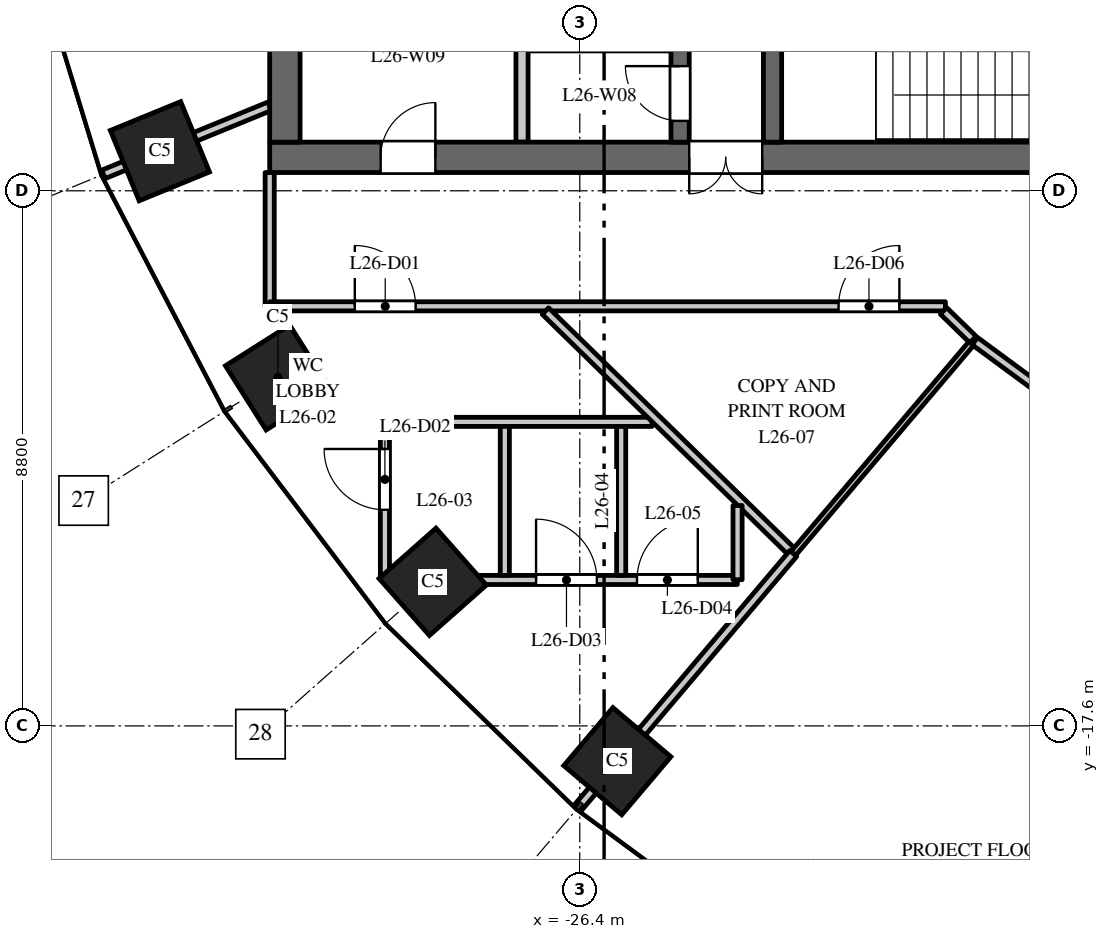
"""IFC4 building model, lengths in metres.
Left out: names, types, materials, properties, quantities, classifications, styles, units other than length and angle.
Written with IfcOpenShell. Run it as: python <this file> out.ifc"""

import sys

from ifc_helpers import new_model, si_unit, direction, frame, frame_2d, origin, origin_2d, place, context, subcontext, project, spatial, rectangle, extrude, element, fill, save


model = new_model("IFC4")
c1 = context("Model", 3, precision=1e-05, world=origin(), true_north=direction((0.0, 1.0)))
c2 = subcontext(c1, "Body", "Model", "MODEL_VIEW")
j1 = project(units=[si_unit("LENGTHUNIT", "METRE"), si_unit("PLANEANGLEUNIT", "RADIAN")], contexts=[c1])
p1 = place(None, origin())
s1 = spatial("IfcSite", under=j1, at=p1, CompositionType="ELEMENT")
p2 = place(p1, origin())
s2 = spatial("IfcBuilding", under=s1, at=p2, CompositionType="ELEMENT")
p3 = place(p2, frame((0.0, 0.0, 116.0)))
s3 = spatial("IfcBuildingStorey", under=s2, at=p3, CompositionType="ELEMENT", Elevation=116.0)
for number, where, z_axis, x_axis in (
    (1, (-33.305, -8.149, 0.0), (0.0, 0.0, 1.0), (0.379, -0.925, 0.0)),
    (2, (-31.365, -11.871, 0.0), (0.0, 0.0, 1.0), (0.535, -0.845, 0.0)),
    (3, (-28.819, -15.23, 0.0), (0.0, 0.0, 1.0), (0.663, -0.749, 0.0)),
    (4, (-25.783, -18.18, 0.0), (0.0, 0.0, 1.0), (0.763, -0.646, 0.0)),
):
    element("IfcColumn", number, at=place(p3, frame(where, z_axis=z_axis, x_axis=x_axis)), inside=s3, PredefinedType="COLUMN", context=c2, shape_type="SweptSolid", body=[
        extrude(rectangle(XDim=1.25, YDim=1.25, at=origin_2d()), origin(), (0.0, 0.0, 1.0), 4.0),
    ])
p4 = place(p3, frame((-16.5, -8.25, 0.0), z_axis=(0.0, 0.0, 1.0), x_axis=(-1.0, 0.0, 0.0)))
e5 = element("IfcWall", 5, at=p4, inside=s3, PredefinedType="SHEAR", context=c2, shape_type="SweptSolid", body=[
    extrude(rectangle(XDim=15.0, YDim=0.5, at=frame_2d((7.5, 0.0))), origin(), (0.0, 0.0, 1.0), 3.7),
])
p5 = place(p4, frame((6.9, 0.0, 0.0)))
e6 = element("IfcOpeningElement", 6, at=p5, cuts=e5, PredefinedType="OPENING", context=c2, shape_type="SweptSolid", body=[
    extrude(rectangle(XDim=1.2, YDim=2.1, at=frame_2d((0.6, 1.05))), frame((0.0, 0.26, 0.0), z_axis=(0.0, -1.0, 0.0), x_axis=(1.0, 0.0, 0.0)), (0.0, 0.0, 1.0), 0.52),
])
p6 = place(p4, frame((12.275, 0.0, 0.0)))
e7 = element("IfcOpeningElement", 7, at=p6, cuts=e5, PredefinedType="OPENING", context=c2, shape_type="SweptSolid", body=[
    extrude(rectangle(XDim=0.9, YDim=2.1, at=frame_2d((0.45, 1.05))), frame((0.0, 0.26, 0.0), z_axis=(0.0, -1.0, 0.0), x_axis=(1.0, 0.0, 0.0)), (0.0, 0.0, 1.0), 0.52),
])
p7 = place(p3, frame((-24.75, -8.0, 0.0), z_axis=(0.0, 0.0, 1.0), x_axis=(0.0, 1.0, 0.0)))
e8 = element("IfcWall", 8, at=p7, inside=s3, PredefinedType="SHEAR", context=c2, shape_type="SweptSolid", body=[
    extrude(rectangle(XDim=16.0, YDim=0.3, at=frame_2d((8.0, 0.0))), origin(), (0.0, 0.0, 1.0), 3.7),
])
p8 = place(p7, frame((4.425, 0.0, 0.0)))
e9 = element("IfcOpeningElement", 9, at=p8, cuts=e8, PredefinedType="OPENING", context=c2, shape_type="SweptSolid", body=[
    extrude(rectangle(XDim=1.1, YDim=2.1, at=frame_2d((0.55, 1.05))), frame((0.0, 0.16, 0.0), z_axis=(0.0, -1.0, 0.0), x_axis=(1.0, 0.0, 0.0)), (0.0, 0.0, 1.0), 0.32),
])
p9 = place(p7, frame((7.45, 0.0, 0.0)))
e10 = element("IfcOpeningElement", 10, at=p9, cuts=e8, PredefinedType="OPENING", context=c2, shape_type="SweptSolid", body=[
    extrude(rectangle(XDim=1.1, YDim=2.1, at=frame_2d((0.55, 1.05))), frame((0.0, 0.16, 0.0), z_axis=(0.0, -1.0, 0.0), x_axis=(1.0, 0.0, 0.0)), (0.0, 0.0, 1.0), 0.32),
])
p10 = place(p7, frame((10.425, 0.0, 0.0)))
e11 = element("IfcOpeningElement", 11, at=p10, cuts=e8, PredefinedType="OPENING", context=c2, shape_type="SweptSolid", body=[
    extrude(rectangle(XDim=1.2, YDim=2.1, at=frame_2d((0.6, 1.05))), frame((0.0, 0.16, 0.0), z_axis=(0.0, -1.0, 0.0), x_axis=(1.0, 0.0, 0.0)), (0.0, 0.0, 1.0), 0.32),
])
p11 = place(p7, frame((13.75, 0.0, 0.0)))
e12 = element("IfcOpeningElement", 12, at=p11, cuts=e8, PredefinedType="OPENING", context=c2, shape_type="SweptSolid", body=[
    extrude(rectangle(XDim=0.9, YDim=2.1, at=frame_2d((0.45, 1.05))), frame((0.0, 0.16, 0.0), z_axis=(0.0, -1.0, 0.0), x_axis=(1.0, 0.0, 0.0)), (0.0, 0.0, 1.0), 0.32),
])
p12 = place(p7, frame((1.975, 0.0, 0.0)))
e13 = element("IfcOpeningElement", 13, at=p12, cuts=e8, PredefinedType="OPENING", context=c2, shape_type="SweptSolid", body=[
    extrude(rectangle(XDim=0.9, YDim=2.1, at=frame_2d((0.45, 1.05))), frame((0.0, 0.16, 0.0), z_axis=(0.0, -1.0, 0.0), x_axis=(1.0, 0.0, 0.0)), (0.0, 0.0, 1.0), 0.32),
])
p13 = place(p7, frame((0.35, 0.0, 0.0)))
e14 = element("IfcOpeningElement", 14, at=p13, cuts=e8, PredefinedType="OPENING", context=c2, shape_type="SweptSolid", body=[
    extrude(rectangle(XDim=0.9, YDim=2.1, at=frame_2d((0.45, 1.05))), frame((0.0, 0.16, 0.0), z_axis=(0.0, -1.0, 0.0), x_axis=(1.0, 0.0, 0.0)), (0.0, 0.0, 1.0), 0.32),
])
p14 = place(p3, frame((-31.25, -8.0, 0.0), z_axis=(0.0, 0.0, 1.0), x_axis=(0.0, 1.0, 0.0)))
e15 = element("IfcWall", 15, at=p14, inside=s3, PredefinedType="SHEAR", context=c2, shape_type="SweptSolid", body=[
    extrude(rectangle(XDim=16.0, YDim=0.5, at=frame_2d((8.0, 0.0))), origin(), (0.0, 0.0, 1.0), 3.7),
])
p15 = place(p3, frame((-27.35, -8.0, 0.0), z_axis=(0.0, 0.0, 1.0), x_axis=(0.0, 1.0, 0.0)))
e16 = element("IfcWall", 16, at=p15, inside=s3, PredefinedType="PARTITIONING", context=c2, shape_type="SweptSolid", body=[
    extrude(rectangle(XDim=3.25, YDim=0.2, at=frame_2d((1.625, 0.0))), origin(), (0.0, 0.0, 1.0), 3.7),
])
p16 = place(p3, frame((-23.23, -8.0, 0.0), z_axis=(0.0, 0.0, 1.0), x_axis=(0.0, 1.0, 0.0)))
e17 = element("IfcWall", 17, at=p16, inside=s3, PredefinedType="SHEAR", context=c2, shape_type="SweptSolid", body=[
    extrude(rectangle(XDim=7.875, YDim=0.3, at=frame_2d((3.938, 0.0))), origin(), (0.0, 0.0, 1.0), 3.7),
])
p17 = place(p16, frame((5.15, 0.0, 0.0)))
e18 = element("IfcOpeningElement", 18, at=p17, cuts=e17, PredefinedType="OPENING", context=c2, shape_type="SweptSolid", body=[
    extrude(rectangle(XDim=1.1, YDim=2.1, at=frame_2d((0.55, 1.05))), frame((0.0, 0.16, 0.0), z_axis=(0.0, -1.0, 0.0), x_axis=(1.0, 0.0, 0.0)), (0.0, 0.0, 1.0), 0.32),
])
p18 = place(p3, frame((-34.234, -8.53, 0.0), z_axis=(0.0, 0.0, 1.0), x_axis=(0.925344112436, 0.379128307542, 0.0)))
e19 = element("IfcWall", 19, at=p18, inside=s3, PredefinedType="PARTITIONING", context=c2, shape_type="SweptSolid", body=[
    extrude(rectangle(XDim=2.954, YDim=0.15, at=frame_2d((1.477, 0.0))), origin(), (0.0, 0.0, 1.0), 2.9),
])
p19 = place(p3, frame((-31.5, -10.7, 0.0), z_axis=(0.0, 0.0, 1.0), x_axis=(0.0, 1.0, 0.0)))
e20 = element("IfcWall", 20, at=p19, inside=s3, PredefinedType="PARTITIONING", context=c2, shape_type="SweptSolid", body=[
    extrude(rectangle(XDim=2.2, YDim=0.15, at=frame_2d((1.1, 0.0))), origin(), (0.0, 0.0, 1.0), 3.7),
])
p20 = place(p3, frame((-31.5, -10.7, 0.0), z_axis=(0.0, 0.0, 1.0), x_axis=(1.0, 0.0, 0.0)))
e21 = element("IfcWall", 21, at=p20, inside=s3, PredefinedType="PARTITIONING", context=c2, shape_type="SweptSolid", body=[
    extrude(rectangle(XDim=11.113, YDim=0.15, at=frame_2d((5.557, 0.0))), origin(), (0.0, 0.0, 1.0), 3.1),
])
p21 = place(p20, frame((1.4, 0.0, 0.0)))
e22 = element("IfcOpeningElement", 22, at=p21, cuts=e21, PredefinedType="OPENING", context=c2, shape_type="SweptSolid", body=[
    extrude(rectangle(XDim=1.0, YDim=2.1, at=frame_2d((0.5, 1.05))), frame((0.0, 0.085, 0.0), z_axis=(0.0, -1.0, 0.0), x_axis=(1.0, 0.0, 0.0)), (0.0, 0.0, 1.0), 0.17),
])
p22 = place(p20, frame((9.356, 0.0, 0.0)))
e23 = element("IfcOpeningElement", 23, at=p22, cuts=e21, PredefinedType="OPENING", context=c2, shape_type="SweptSolid", body=[
    extrude(rectangle(XDim=1.0, YDim=2.1, at=frame_2d((0.5, 1.05))), frame((0.0, 0.085, 0.0), z_axis=(0.0, -1.0, 0.0), x_axis=(1.0, 0.0, 0.0)), (0.0, 0.0, 1.0), 0.17),
])
p23 = place(p3, frame((-29.605, -15.196, 0.0), z_axis=(0.0, 0.0, 1.0), x_axis=(0.0, 1.0, 0.0)))
e24 = element("IfcWall", 24, at=p23, inside=s3, PredefinedType="PARTITIONING", context=c2, shape_type="SweptSolid", body=[
    extrude(rectangle(XDim=2.596, YDim=0.15, at=frame_2d((1.298, 0.0))), origin(), (0.0, 0.0, 1.0), 2.9),
])
p24 = place(p23, frame((1.15, 0.0, 0.0)))
e25 = element("IfcOpeningElement", 25, at=p24, cuts=e24, PredefinedType="OPENING", context=c2, shape_type="SweptSolid", body=[
    extrude(rectangle(XDim=1.0, YDim=2.1, at=frame_2d((0.5, 1.05))), frame((0.0, 0.085, 0.0), z_axis=(0.0, -1.0, 0.0), x_axis=(1.0, 0.0, 0.0)), (0.0, 0.0, 1.0), 0.17),
])
p25 = place(p3, frame((-29.605, -12.6, 0.0), z_axis=(0.0, 0.0, 1.0), x_axis=(1.0, 0.0, 0.0)))
e26 = element("IfcWall", 26, at=p25, inside=s3, PredefinedType="PARTITIONING", context=c2, shape_type="SweptSolid", body=[
    extrude(rectangle(XDim=4.393, YDim=0.15, at=frame_2d((2.197, 0.0))), origin(), (0.0, 0.0, 1.0), 3.7),
])
p26 = place(p3, frame((-29.601, -15.2, 0.0), z_axis=(0.0, 0.0, 1.0), x_axis=(1.0, 0.0, 0.0)))
e27 = element("IfcWall", 27, at=p26, inside=s3, PredefinedType="PARTITIONING", context=c2, shape_type="SweptSolid", body=[
    extrude(rectangle(XDim=5.792, YDim=0.15, at=frame_2d((2.896, 0.0))), origin(), (0.0, 0.0, 1.0), 2.9),
])
p27 = place(p26, frame((2.482, 0.0, 0.0)))
e28 = element("IfcOpeningElement", 28, at=p27, cuts=e27, PredefinedType="OPENING", context=c2, shape_type="SweptSolid", body=[
    extrude(rectangle(XDim=1.0, YDim=2.1, at=frame_2d((0.5, 1.05))), frame((0.0, 0.085, 0.0), z_axis=(0.0, -1.0, 0.0), x_axis=(1.0, 0.0, 0.0)), (0.0, 0.0, 1.0), 0.17),
])
p28 = place(p26, frame((4.142, 0.0, 0.0)))
e29 = element("IfcOpeningElement", 29, at=p28, cuts=e27, PredefinedType="OPENING", context=c2, shape_type="SweptSolid", body=[
    extrude(rectangle(XDim=1.0, YDim=2.1, at=frame_2d((0.5, 1.05))), frame((0.0, 0.085, 0.0), z_axis=(0.0, -1.0, 0.0), x_axis=(1.0, 0.0, 0.0)), (0.0, 0.0, 1.0), 0.17),
])
p29 = place(p3, frame((-27.633, -15.125, 0.0), z_axis=(0.0, 0.0, 1.0), x_axis=(0.0, 1.0, 0.0)))
e30 = element("IfcWall", 30, at=p29, inside=s3, PredefinedType="PARTITIONING", context=c2, shape_type="SweptSolid", body=[
    extrude(rectangle(XDim=2.45, YDim=0.15, at=frame_2d((1.225, 0.0))), origin(), (0.0, 0.0, 1.0), 3.7),
])
p30 = place(p3, frame((-26.965, -10.778, 0.0), z_axis=(0.0, 0.0, 1.0), x_axis=(0.715154119379, -0.698966798593, 0.0)))
e31 = element("IfcWall", 31, at=p30, inside=s3, PredefinedType="PARTITIONING", context=c2, shape_type="SweptSolid", body=[
    extrude(rectangle(XDim=5.701, YDim=0.15, at=frame_2d((2.851, 0.0))), origin(), (0.0, 0.0, 1.0), 3.7),
])
p31 = place(p3, frame((-26.43, -18.945, 0.0), z_axis=(0.0, 0.0, 1.0), x_axis=(0.646289642104, 0.763092195288, 0.0)))
e32 = element("IfcWall", 32, at=p31, inside=s3, PredefinedType="PARTITIONING", context=c2, shape_type="SweptSolid", body=[
    extrude(rectangle(XDim=5.48, YDim=0.15, at=frame_2d((2.74, 0.0))), origin(), (0.0, 0.0, 1.0), 2.75),
])
p32 = place(p3, frame((-25.719, -15.125, 0.0), z_axis=(0.0, 0.0, 1.0), x_axis=(0.0, 1.0, 0.0)))
e33 = element("IfcWall", 33, at=p32, inside=s3, PredefinedType="PARTITIONING", context=c2, shape_type="SweptSolid", body=[
    extrude(rectangle(XDim=2.45, YDim=0.15, at=frame_2d((1.225, 0.0))), origin(), (0.0, 0.0, 1.0), 3.7),
])
p33 = place(p3, frame((-23.805, -15.196, 0.0), z_axis=(0.0, 0.0, 1.0), x_axis=(0.0, 1.0, 0.0)))
e34 = element("IfcWall", 34, at=p33, inside=s3, PredefinedType="PARTITIONING", context=c2, shape_type="SweptSolid", body=[
    extrude(rectangle(XDim=1.22, YDim=0.15, at=frame_2d((0.61, 0.0))), origin(), (0.0, 0.0, 1.0), 3.7),
])
p34 = place(p3, frame((-22.888, -14.763, 0.0), z_axis=(0.0, 0.0, 1.0), x_axis=(0.646640834677, 0.7627946191, 0.0)))
e35 = element("IfcWall", 35, at=p34, inside=s3, PredefinedType="PARTITIONING", context=c2, shape_type="SweptSolid", body=[
    extrude(rectangle(XDim=4.588, YDim=0.1, at=frame_2d((2.294, 0.0))), origin(), (0.0, 0.0, 1.0), 3.7),
])
p35 = place(p3, frame((-20.418, -10.775, 0.0), z_axis=(0.0, 0.0, 1.0), x_axis=(0.717145300924, -0.69692368116, 0.0)))
e36 = element("IfcWall", 36, at=p35, inside=s3, PredefinedType="PARTITIONING", context=c2, shape_type="SweptSolid", body=[
    extrude(rectangle(XDim=0.676, YDim=0.15, at=frame_2d((0.338, 0.0))), origin(), (0.0, 0.0, 1.0), 3.7),
])
p36 = place(p3, frame((-19.903, -11.272, 0.0), z_axis=(0.0, 0.0, 1.0), x_axis=(0.805228684186, -0.592964388613, 0.0)))
e37 = element("IfcWall", 37, at=p36, inside=s3, PredefinedType="PARTITIONING", context=c2, shape_type="SweptSolid", body=[
    extrude(rectangle(XDim=3.052, YDim=0.15, at=frame_2d((1.526, 0.0))), origin(), (0.0, 0.0, 1.0), 2.75),
])
p37 = place(p5, origin())
e38 = element("IfcDoor", 38, at=p37, inside=s3, OperationType="DOUBLE_DOOR_DOUBLE_SWING", PredefinedType="DOOR", context=c2, shape_type="SweptSolid", body=[
    extrude(rectangle(XDim=1.2, YDim=2.1, at=frame_2d((0.6, 1.05))), frame((0.0, 0.025, 0.0), z_axis=(0.0, -1.0, 0.0), x_axis=(1.0, 0.0, 0.0)), (0.0, 0.0, 1.0), 0.05),
])
fill(e6, e38)
p38 = place(p13, origin())
e39 = element("IfcDoor", 39, at=p38, inside=s3, OperationType="SINGLE_SWING_LEFT", PredefinedType="DOOR", context=c2, shape_type="SweptSolid", body=[
    extrude(rectangle(XDim=0.9, YDim=2.1, at=frame_2d((0.45, 1.05))), frame((0.0, 0.025, 0.0), z_axis=(0.0, -1.0, 0.0), x_axis=(1.0, 0.0, 0.0)), (0.0, 0.0, 1.0), 0.05),
])
fill(e14, e39)
p39 = place(p6, origin())
e40 = element("IfcDoor", 40, at=p39, inside=s3, OperationType="SINGLE_SWING_LEFT", PredefinedType="DOOR", context=c2, shape_type="SweptSolid", body=[
    extrude(rectangle(XDim=0.9, YDim=2.1, at=frame_2d((0.45, 1.05))), frame((0.0, 0.025, 0.0), z_axis=(0.0, -1.0, 0.0), x_axis=(1.0, 0.0, 0.0)), (0.0, 0.0, 1.0), 0.05),
])
fill(e7, e40)
p40 = place(p21, origin())
e41 = element("IfcDoor", 41, at=p40, inside=s3, OperationType="SINGLE_SWING_LEFT", PredefinedType="DOOR", context=c2, shape_type="SweptSolid", body=[
    extrude(rectangle(XDim=1.0, YDim=2.1, at=frame_2d((0.5, 1.05))), frame((0.0, 0.025, 0.0), z_axis=(0.0, -1.0, 0.0), x_axis=(1.0, 0.0, 0.0)), (0.0, 0.0, 1.0), 0.05),
])
fill(e22, e41)
p41 = place(p24, origin())
e42 = element("IfcDoor", 42, at=p41, inside=s3, OperationType="SINGLE_SWING_RIGHT", PredefinedType="DOOR", context=c2, shape_type="SweptSolid", body=[
    extrude(rectangle(XDim=1.0, YDim=2.1, at=frame_2d((0.5, 1.05))), frame((0.0, 0.025, 0.0), z_axis=(0.0, -1.0, 0.0), x_axis=(1.0, 0.0, 0.0)), (0.0, 0.0, 1.0), 0.05),
])
fill(e25, e42)
p42 = place(p27, origin())
e43 = element("IfcDoor", 43, at=p42, inside=s3, OperationType="SINGLE_SWING_LEFT", PredefinedType="DOOR", context=c2, shape_type="SweptSolid", body=[
    extrude(rectangle(XDim=1.0, YDim=2.1, at=frame_2d((0.5, 1.05))), frame((0.0, 0.025, 0.0), z_axis=(0.0, -1.0, 0.0), x_axis=(1.0, 0.0, 0.0)), (0.0, 0.0, 1.0), 0.05),
])
fill(e28, e43)
p43 = place(p28, origin())
e44 = element("IfcDoor", 44, at=p43, inside=s3, OperationType="SINGLE_SWING_RIGHT", PredefinedType="DOOR", context=c2, shape_type="SweptSolid", body=[
    extrude(rectangle(XDim=1.0, YDim=2.1, at=frame_2d((0.5, 1.05))), frame((0.0, 0.025, 0.0), z_axis=(0.0, -1.0, 0.0), x_axis=(1.0, 0.0, 0.0)), (0.0, 0.0, 1.0), 0.05),
])
fill(e29, e44)
p44 = place(p22, origin())
e45 = element("IfcDoor", 45, at=p44, inside=s3, OperationType="SINGLE_SWING_RIGHT", PredefinedType="DOOR", context=c2, shape_type="SweptSolid", body=[
    extrude(rectangle(XDim=1.0, YDim=2.1, at=frame_2d((0.5, 1.05))), frame((0.0, 0.025, 0.0), z_axis=(0.0, -1.0, 0.0), x_axis=(1.0, 0.0, 0.0)), (0.0, 0.0, 1.0), 0.05),
])
fill(e23, e45)
save(model, sys.argv[1])
